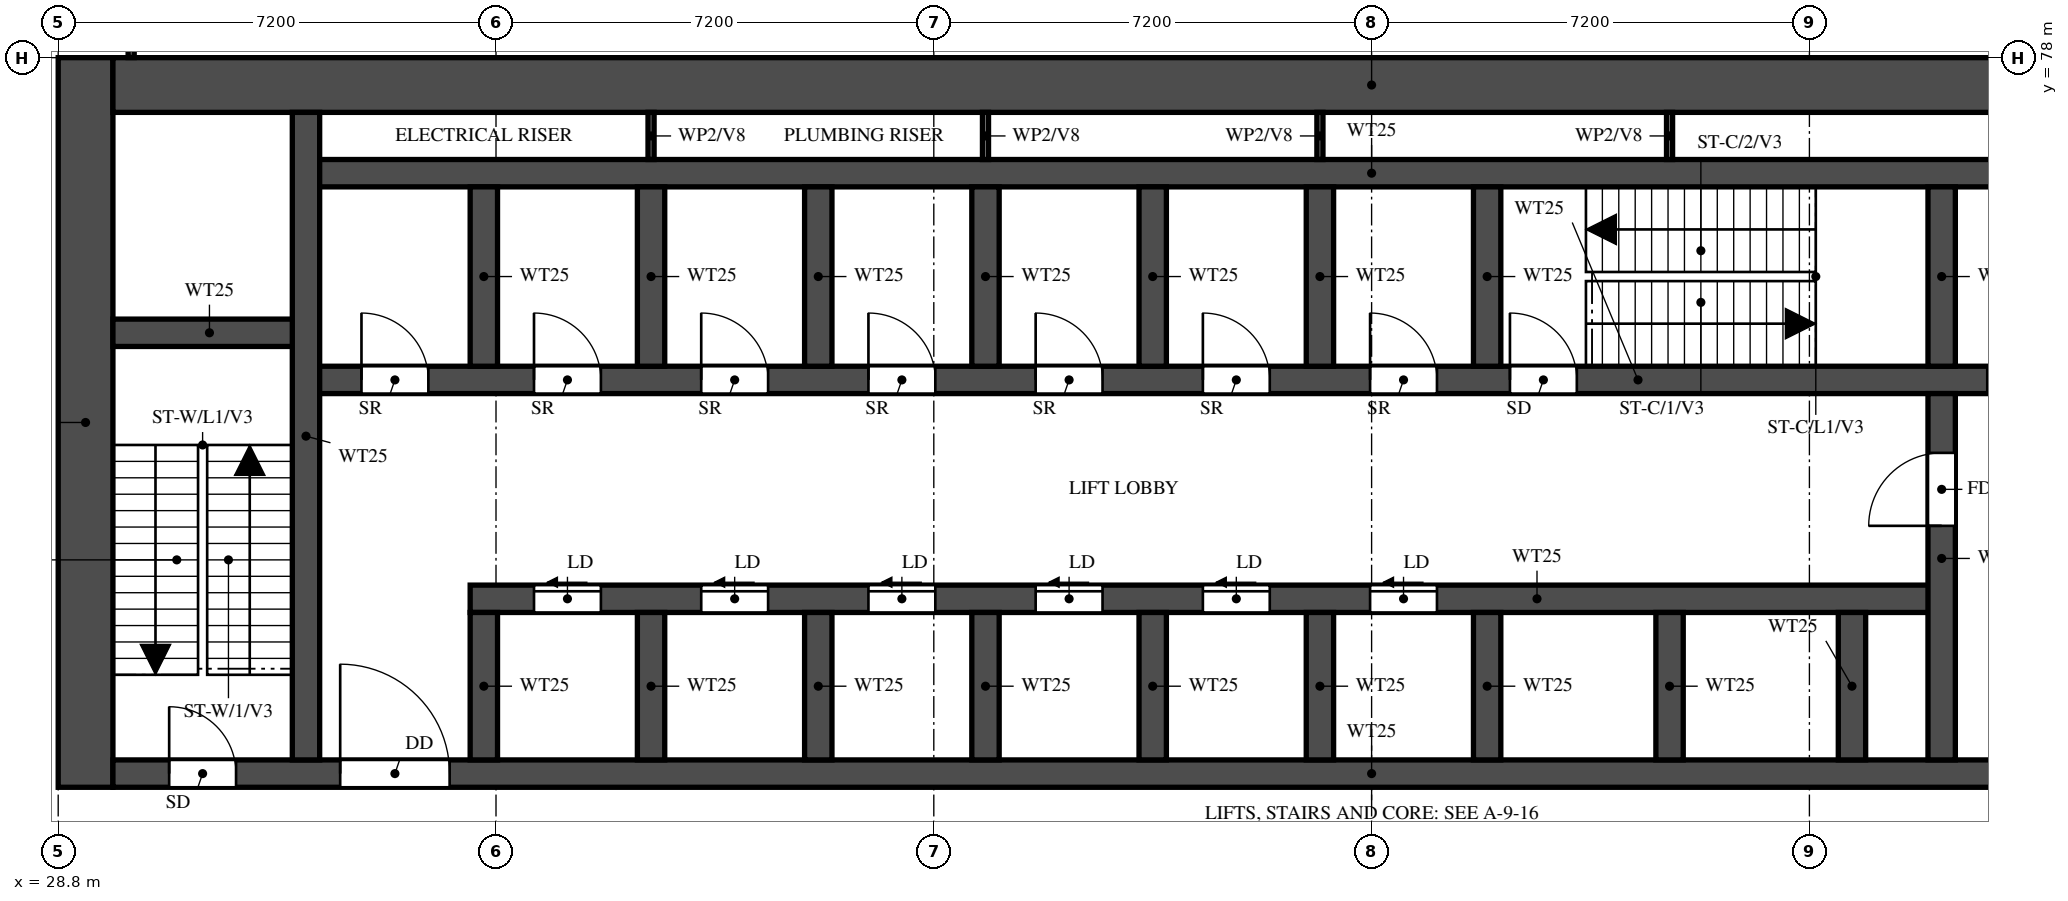
"""IFC4 building model, lengths in metres.
Left out: names, types, materials, properties, quantities, classifications, styles, units other than length and angle.
Written with IfcOpenShell. Run it as: python <this file> out.ifc"""

import sys

from ifc_helpers import new_model, si_unit, direction, frame, frame_2d, origin, place, context, subcontext, project, spatial, rectangle, extrude, element, fill, save


model = new_model("IFC4")
c1 = context("Model", 3, precision=1e-05, world=origin(), true_north=direction((0.0, 1.0)))
c2 = subcontext(c1, "Body", "Model", "MODEL_VIEW")
j1 = project(units=[si_unit("LENGTHUNIT", "METRE"), si_unit("PLANEANGLEUNIT", "RADIAN")], contexts=[c1])
p1 = place(None, origin())
s1 = spatial("IfcSite", under=j1, at=p1, CompositionType="ELEMENT")
p2 = place(p1, origin())
s2 = spatial("IfcBuilding", under=s1, at=p2, CompositionType="ELEMENT")
p3 = place(p2, frame((0.0, 0.0, 107.5)))
s3 = spatial("IfcBuildingStorey", under=s2, at=p3, CompositionType="ELEMENT", Elevation=107.5)
p4 = place(p3, frame((29.25, 66.0, 0.0), z_axis=(0.0, 0.0, 1.0), x_axis=(0.0, 1.0, 0.0)))
e1 = element("IfcWall", 1, at=p4, inside=s3, PredefinedType="SHEAR", context=c2, shape_type="SweptSolid", body=[
    extrude(rectangle(XDim=12.0, YDim=0.9, at=frame_2d((6.0, 0.0))), origin(), (0.0, 0.0, 1.0), 5.2),
])
p5 = place(p3, frame((29.7, 77.55, 0.0), z_axis=(0.0, 0.0, 1.0), x_axis=(1.0, 0.0, 0.0)))
e2 = element("IfcWall", 2, at=p5, inside=s3, PredefinedType="SHEAR", context=c2, shape_type="SweptSolid", body=[
    extrude(rectangle(XDim=41.4, YDim=0.9, at=frame_2d((20.7, 0.0))), origin(), (0.0, 0.0, 1.0), 5.2),
])
p6 = place(p3, frame((29.7, 66.225, 0.0), z_axis=(0.0, 0.0, 1.0), x_axis=(1.0, 0.0, 0.0)))
e3 = element("IfcWall", 3, at=p6, inside=s3, PredefinedType="SHEAR", context=c2, shape_type="SweptSolid", body=[
    extrude(rectangle(XDim=41.4, YDim=0.45, at=frame_2d((20.7, 0.0))), origin(), (0.0, 0.0, 1.0), 5.2),
])
p7 = place(p6, frame((0.925, 0.0, 0.0)))
e4 = element("IfcOpeningElement", 4, at=p7, cuts=e3, PredefinedType="OPENING", context=c2, shape_type="SweptSolid", body=[
    extrude(rectangle(XDim=1.1, YDim=2.1, at=frame_2d((0.55, 1.05))), frame((0.0, 0.235, 0.0), z_axis=(0.0, -1.0, 0.0), x_axis=(1.0, 0.0, 0.0)), (0.0, 0.0, 1.0), 0.47),
])
p8 = place(p6, frame((3.738, 0.0, 0.0)))
e5 = element("IfcOpeningElement", 5, at=p8, cuts=e3, PredefinedType="OPENING", context=c2, shape_type="SweptSolid", body=[
    extrude(rectangle(XDim=1.8, YDim=2.1, at=frame_2d((0.9, 1.05))), frame((0.0, 0.235, 0.0), z_axis=(0.0, -1.0, 0.0), x_axis=(1.0, 0.0, 0.0)), (0.0, 0.0, 1.0), 0.47),
])
p9 = place(p3, frame((35.575, 69.1, 0.0), z_axis=(0.0, 0.0, 1.0), x_axis=(1.0, 0.0, 0.0)))
e6 = element("IfcWall", 6, at=p9, inside=s3, PredefinedType="SHEAR", context=c2, shape_type="SweptSolid", body=[
    extrude(rectangle(XDim=24.2, YDim=0.45, at=frame_2d((12.1, 0.0))), origin(), (0.0, 0.0, 1.0), 5.2),
])
p10 = place(p9, frame((1.05, 0.0, 0.0)))
e7 = element("IfcOpeningElement", 7, at=p10, cuts=e6, PredefinedType="OPENING", context=c2, shape_type="SweptSolid", body=[
    extrude(rectangle(XDim=1.1, YDim=2.1, at=frame_2d((0.55, 1.05))), frame((0.0, 0.235, 0.0), z_axis=(0.0, -1.0, 0.0), x_axis=(1.0, 0.0, 0.0)), (0.0, 0.0, 1.0), 0.47),
])
p11 = place(p9, frame((3.8, 0.0, 0.0)))
e8 = element("IfcOpeningElement", 8, at=p11, cuts=e6, PredefinedType="OPENING", context=c2, shape_type="SweptSolid", body=[
    extrude(rectangle(XDim=1.1, YDim=2.1, at=frame_2d((0.55, 1.05))), frame((0.0, 0.235, 0.0), z_axis=(0.0, -1.0, 0.0), x_axis=(1.0, 0.0, 0.0)), (0.0, 0.0, 1.0), 0.47),
])
p12 = place(p9, frame((6.55, 0.0, 0.0)))
e9 = element("IfcOpeningElement", 9, at=p12, cuts=e6, PredefinedType="OPENING", context=c2, shape_type="SweptSolid", body=[
    extrude(rectangle(XDim=1.1, YDim=2.1, at=frame_2d((0.55, 1.05))), frame((0.0, 0.235, 0.0), z_axis=(0.0, -1.0, 0.0), x_axis=(1.0, 0.0, 0.0)), (0.0, 0.0, 1.0), 0.47),
])
p13 = place(p9, frame((9.3, 0.0, 0.0)))
e10 = element("IfcOpeningElement", 10, at=p13, cuts=e6, PredefinedType="OPENING", context=c2, shape_type="SweptSolid", body=[
    extrude(rectangle(XDim=1.1, YDim=2.1, at=frame_2d((0.55, 1.05))), frame((0.0, 0.235, 0.0), z_axis=(0.0, -1.0, 0.0), x_axis=(1.0, 0.0, 0.0)), (0.0, 0.0, 1.0), 0.47),
])
p14 = place(p9, frame((12.05, 0.0, 0.0)))
e11 = element("IfcOpeningElement", 11, at=p14, cuts=e6, PredefinedType="OPENING", context=c2, shape_type="SweptSolid", body=[
    extrude(rectangle(XDim=1.1, YDim=2.1, at=frame_2d((0.55, 1.05))), frame((0.0, 0.235, 0.0), z_axis=(0.0, -1.0, 0.0), x_axis=(1.0, 0.0, 0.0)), (0.0, 0.0, 1.0), 0.47),
])
p15 = place(p9, frame((14.8, 0.0, 0.0)))
e12 = element("IfcOpeningElement", 12, at=p15, cuts=e6, PredefinedType="OPENING", context=c2, shape_type="SweptSolid", body=[
    extrude(rectangle(XDim=1.1, YDim=2.1, at=frame_2d((0.55, 1.05))), frame((0.0, 0.235, 0.0), z_axis=(0.0, -1.0, 0.0), x_axis=(1.0, 0.0, 0.0)), (0.0, 0.0, 1.0), 0.47),
])
p16 = place(p3, frame((32.875, 72.7, 0.0), z_axis=(0.0, 0.0, 1.0), x_axis=(1.0, 0.0, 0.0)))
e13 = element("IfcWall", 13, at=p16, inside=s3, PredefinedType="SHEAR", context=c2, shape_type="SweptSolid", body=[
    extrude(rectangle(XDim=35.05, YDim=0.45, at=frame_2d((17.525, 0.0))), origin(), (0.0, 0.0, 1.0), 5.2),
])
p17 = place(p16, frame((19.8, 0.0, 0.0)))
e14 = element("IfcOpeningElement", 14, at=p17, cuts=e13, PredefinedType="OPENING", context=c2, shape_type="SweptSolid", body=[
    extrude(rectangle(XDim=1.1, YDim=2.1, at=frame_2d((0.55, 1.05))), frame((0.0, 0.235, 0.0), z_axis=(0.0, -1.0, 0.0), x_axis=(1.0, 0.0, 0.0)), (0.0, 0.0, 1.0), 0.47),
])
p18 = place(p16, frame((27.65, 0.0, 0.0)))
e15 = element("IfcOpeningElement", 15, at=p18, cuts=e13, PredefinedType="OPENING", context=c2, shape_type="SweptSolid", body=[
    extrude(rectangle(XDim=1.1, YDim=2.1, at=frame_2d((0.55, 1.05))), frame((0.0, 0.235, 0.0), z_axis=(0.0, -1.0, 0.0), x_axis=(1.0, 0.0, 0.0)), (0.0, 0.0, 1.0), 0.47),
])
p19 = place(p16, frame((30.25, 0.0, 0.0)))
e16 = element("IfcOpeningElement", 16, at=p19, cuts=e13, PredefinedType="OPENING", context=c2, shape_type="SweptSolid", body=[
    extrude(rectangle(XDim=1.1, YDim=2.1, at=frame_2d((0.55, 1.05))), frame((0.0, 0.235, 0.0), z_axis=(0.0, -1.0, 0.0), x_axis=(1.0, 0.0, 0.0)), (0.0, 0.0, 1.0), 0.47),
])
p20 = place(p16, frame((3.75, 0.0, 0.0)))
e17 = element("IfcOpeningElement", 17, at=p20, cuts=e13, PredefinedType="OPENING", context=c2, shape_type="SweptSolid", body=[
    extrude(rectangle(XDim=1.1, YDim=2.1, at=frame_2d((0.55, 1.05))), frame((0.0, 0.235, 0.0), z_axis=(0.0, -1.0, 0.0), x_axis=(1.0, 0.0, 0.0)), (0.0, 0.0, 1.0), 0.47),
])
p21 = place(p16, frame((6.5, 0.0, 0.0)))
e18 = element("IfcOpeningElement", 18, at=p21, cuts=e13, PredefinedType="OPENING", context=c2, shape_type="SweptSolid", body=[
    extrude(rectangle(XDim=1.1, YDim=2.1, at=frame_2d((0.55, 1.05))), frame((0.0, 0.235, 0.0), z_axis=(0.0, -1.0, 0.0), x_axis=(1.0, 0.0, 0.0)), (0.0, 0.0, 1.0), 0.47),
])
p22 = place(p16, frame((9.25, 0.0, 0.0)))
e19 = element("IfcOpeningElement", 19, at=p22, cuts=e13, PredefinedType="OPENING", context=c2, shape_type="SweptSolid", body=[
    extrude(rectangle(XDim=1.1, YDim=2.1, at=frame_2d((0.55, 1.05))), frame((0.0, 0.235, 0.0), z_axis=(0.0, -1.0, 0.0), x_axis=(1.0, 0.0, 0.0)), (0.0, 0.0, 1.0), 0.47),
])
p23 = place(p16, frame((12.0, 0.0, 0.0)))
e20 = element("IfcOpeningElement", 20, at=p23, cuts=e13, PredefinedType="OPENING", context=c2, shape_type="SweptSolid", body=[
    extrude(rectangle(XDim=1.1, YDim=2.1, at=frame_2d((0.55, 1.05))), frame((0.0, 0.235, 0.0), z_axis=(0.0, -1.0, 0.0), x_axis=(1.0, 0.0, 0.0)), (0.0, 0.0, 1.0), 0.47),
])
p24 = place(p16, frame((14.75, 0.0, 0.0)))
e21 = element("IfcOpeningElement", 21, at=p24, cuts=e13, PredefinedType="OPENING", context=c2, shape_type="SweptSolid", body=[
    extrude(rectangle(XDim=1.1, YDim=2.1, at=frame_2d((0.55, 1.05))), frame((0.0, 0.235, 0.0), z_axis=(0.0, -1.0, 0.0), x_axis=(1.0, 0.0, 0.0)), (0.0, 0.0, 1.0), 0.47),
])
p25 = place(p16, frame((17.5, 0.0, 0.0)))
e22 = element("IfcOpeningElement", 22, at=p25, cuts=e13, PredefinedType="OPENING", context=c2, shape_type="SweptSolid", body=[
    extrude(rectangle(XDim=1.1, YDim=2.1, at=frame_2d((0.55, 1.05))), frame((0.0, 0.235, 0.0), z_axis=(0.0, -1.0, 0.0), x_axis=(1.0, 0.0, 0.0)), (0.0, 0.0, 1.0), 0.47),
])
p26 = place(p16, frame((0.913, 0.0, 0.0)))
e23 = element("IfcOpeningElement", 23, at=p26, cuts=e13, PredefinedType="OPENING", context=c2, shape_type="SweptSolid", body=[
    extrude(rectangle(XDim=1.1, YDim=2.1, at=frame_2d((0.55, 1.05))), frame((0.0, 0.235, 0.0), z_axis=(0.0, -1.0, 0.0), x_axis=(1.0, 0.0, 0.0)), (0.0, 0.0, 1.0), 0.47),
])
p27 = place(p3, frame((32.875, 76.1, 0.0), z_axis=(0.0, 0.0, 1.0), x_axis=(1.0, 0.0, 0.0)))
e24 = element("IfcWall", 24, at=p27, inside=s3, PredefinedType="SHEAR", context=c2, shape_type="SweptSolid", body=[
    extrude(rectangle(XDim=35.05, YDim=0.45, at=frame_2d((17.525, 0.0))), origin(), (0.0, 0.0, 1.0), 5.2),
])
p28 = place(p3, frame((29.7, 73.475, 0.0), z_axis=(0.0, 0.0, 1.0), x_axis=(1.0, 0.0, 0.0)))
e25 = element("IfcWall", 25, at=p28, inside=s3, PredefinedType="SHEAR", context=c2, shape_type="SweptSolid", body=[
    extrude(rectangle(XDim=3.175, YDim=0.45, at=frame_2d((1.587, 0.0))), origin(), (0.0, 0.0, 1.0), 5.2),
])
p29 = place(p3, frame((32.875, 66.45, 0.0), z_axis=(0.0, 0.0, 1.0), x_axis=(0.0, 1.0, 0.0)))
e26 = element("IfcWall", 26, at=p29, inside=s3, PredefinedType="SHEAR", context=c2, shape_type="SweptSolid", body=[
    extrude(rectangle(XDim=10.65, YDim=0.45, at=frame_2d((5.325, 0.0))), origin(), (0.0, 0.0, 1.0), 5.2),
])
p30 = place(p3, frame((59.775, 66.45, 0.0), z_axis=(0.0, 0.0, 1.0), x_axis=(0.0, 1.0, 0.0)))
e27 = element("IfcWall", 27, at=p30, inside=s3, PredefinedType="SHEAR", context=c2, shape_type="SweptSolid", body=[
    extrude(rectangle(XDim=6.025, YDim=0.45, at=frame_2d((3.013, 0.0))), origin(), (0.0, 0.0, 1.0), 5.2),
])
p31 = place(p30, frame((3.85, 0.0, 0.0)))
e28 = element("IfcOpeningElement", 28, at=p31, cuts=e27, PredefinedType="OPENING", context=c2, shape_type="SweptSolid", body=[
    extrude(rectangle(XDim=1.2, YDim=2.1, at=frame_2d((0.6, 1.05))), frame((0.0, 0.235, 0.0), z_axis=(0.0, -1.0, 0.0), x_axis=(1.0, 0.0, 0.0)), (0.0, 0.0, 1.0), 0.47),
])
p32 = place(p3, frame((59.775, 72.925, 0.0), z_axis=(0.0, 0.0, 1.0), x_axis=(0.0, 1.0, 0.0)))
e29 = element("IfcWall", 29, at=p32, inside=s3, PredefinedType="SHEAR", context=c2, shape_type="SweptSolid", body=[
    extrude(rectangle(XDim=2.95, YDim=0.45, at=frame_2d((1.475, 0.0))), origin(), (0.0, 0.0, 1.0), 5.2),
])
for number, where, z_axis, x_axis in (
    (30, (35.8, 66.45, 0.0), (0.0, 0.0, 1.0), (0.0, 1.0, 0.0)),
    (31, (38.55, 66.45, 0.0), (0.0, 0.0, 1.0), (0.0, 1.0, 0.0)),
    (32, (41.3, 66.45, 0.0), (0.0, 0.0, 1.0), (0.0, 1.0, 0.0)),
    (33, (44.05, 66.45, 0.0), (0.0, 0.0, 1.0), (0.0, 1.0, 0.0)),
    (34, (46.8, 66.45, 0.0), (0.0, 0.0, 1.0), (0.0, 1.0, 0.0)),
    (35, (49.55, 66.45, 0.0), (0.0, 0.0, 1.0), (0.0, 1.0, 0.0)),
    (36, (52.3, 66.45, 0.0), (0.0, 0.0, 1.0), (0.0, 1.0, 0.0)),
    (37, (55.3, 66.45, 0.0), (0.0, 0.0, 1.0), (0.0, 1.0, 0.0)),
    (38, (58.3, 66.45, 0.0), (0.0, 0.0, 1.0), (0.0, 1.0, 0.0)),
):
    element("IfcWall", number, at=place(p3, frame(where, z_axis=z_axis, x_axis=x_axis)), inside=s3, PredefinedType="SHEAR", context=c2, shape_type="SweptSolid", body=[
        extrude(rectangle(XDim=2.425, YDim=0.45, at=frame_2d((1.212, 0.0))), origin(), (0.0, 0.0, 1.0), 5.2),
    ])
for number, where, z_axis, x_axis in (
    (39, (35.8, 72.925, 0.0), (0.0, 0.0, 1.0), (0.0, 1.0, 0.0)),
    (40, (38.55, 72.925, 0.0), (0.0, 0.0, 1.0), (0.0, 1.0, 0.0)),
    (41, (41.3, 72.925, 0.0), (0.0, 0.0, 1.0), (0.0, 1.0, 0.0)),
    (42, (44.05, 72.925, 0.0), (0.0, 0.0, 1.0), (0.0, 1.0, 0.0)),
    (43, (46.8, 72.925, 0.0), (0.0, 0.0, 1.0), (0.0, 1.0, 0.0)),
    (44, (49.55, 72.925, 0.0), (0.0, 0.0, 1.0), (0.0, 1.0, 0.0)),
    (45, (52.3, 72.925, 0.0), (0.0, 0.0, 1.0), (0.0, 1.0, 0.0)),
):
    element("IfcWall", number, at=place(p3, frame(where, z_axis=z_axis, x_axis=x_axis)), inside=s3, PredefinedType="SHEAR", context=c2, shape_type="SweptSolid", body=[
        extrude(rectangle(XDim=2.95, YDim=0.45, at=frame_2d((1.475, 0.0))), origin(), (0.0, 0.0, 1.0), 5.2),
    ])
for number, where, z_axis, x_axis in (
    (46, (38.55, 76.325, 0.0), (0.0, 0.0, 1.0), (0.0, 1.0, 0.0)),
    (47, (44.05, 76.325, 0.0), (0.0, 0.0, 1.0), (0.0, 1.0, 0.0)),
    (48, (49.55, 76.325, 0.0), (0.0, 0.0, 1.0), (0.0, 1.0, 0.0)),
    (49, (55.3, 76.325, 0.0), (0.0, 0.0, 1.0), (0.0, 1.0, 0.0)),
):
    element("IfcWall", number, at=place(p3, frame(where, z_axis=z_axis, x_axis=x_axis)), inside=s3, PredefinedType="PARTITIONING", context=c2, shape_type="SweptSolid", body=[
        extrude(rectangle(XDim=0.775, YDim=0.1, at=frame_2d((0.388, 0.0))), origin(), (0.0, 0.0, 1.0), 5.2),
    ])
p33 = place(p3, frame((30.0, 78.002, 0.0), z_axis=(0.0, 0.0, 1.0), x_axis=(0.0, 1.0, 0.0)))
e50 = element("IfcWall", 50, at=p33, inside=s3, PredefinedType="PARTITIONING", context=c2, shape_type="SweptSolid", body=[
    extrude(rectangle(XDim=1.398, YDim=0.1, at=frame_2d((0.699, 0.0))), origin(), (0.0, 0.0, 1.0), 5.2),
])
p34 = place(p7, origin())
e51 = element("IfcDoor", 51, at=p34, inside=s3, OperationType="SINGLE_SWING_LEFT", PredefinedType="DOOR", context=c2, shape_type="SweptSolid", body=[
    extrude(rectangle(XDim=1.1, YDim=2.1, at=frame_2d((0.55, 1.05))), frame((0.0, 0.025, 0.0), z_axis=(0.0, -1.0, 0.0), x_axis=(1.0, 0.0, 0.0)), (0.0, 0.0, 1.0), 0.05),
])
fill(e4, e51)
p35 = place(p17, origin())
e52 = element("IfcDoor", 52, at=p35, inside=s3, OperationType="SINGLE_SWING_LEFT", PredefinedType="DOOR", context=c2, shape_type="SweptSolid", body=[
    extrude(rectangle(XDim=1.1, YDim=2.1, at=frame_2d((0.55, 1.05))), frame((0.0, 0.025, 0.0), z_axis=(0.0, -1.0, 0.0), x_axis=(1.0, 0.0, 0.0)), (0.0, 0.0, 1.0), 0.05),
])
fill(e14, e52)
p36 = place(p8, origin())
e53 = element("IfcDoor", 53, at=p36, inside=s3, OperationType="DOUBLE_DOOR_SINGLE_SWING", PredefinedType="DOOR", context=c2, shape_type="SweptSolid", body=[
    extrude(rectangle(XDim=1.8, YDim=2.1, at=frame_2d((0.9, 1.05))), frame((0.0, 0.025, 0.0), z_axis=(0.0, -1.0, 0.0), x_axis=(1.0, 0.0, 0.0)), (0.0, 0.0, 1.0), 0.05),
])
fill(e5, e53)
p37 = place(p31, origin())
e54 = element("IfcDoor", 54, at=p37, inside=s3, OperationType="SINGLE_SWING_RIGHT", PredefinedType="DOOR", context=c2, shape_type="SweptSolid", body=[
    extrude(rectangle(XDim=1.2, YDim=2.1, at=frame_2d((0.6, 1.05))), frame((0.0, 0.025, 0.0), z_axis=(0.0, -1.0, 0.0), x_axis=(1.0, 0.0, 0.0)), (0.0, 0.0, 1.0), 0.05),
])
fill(e28, e54)
p38 = place(p18, origin())
e55 = element("IfcDoor", 55, at=p38, inside=s3, OperationType="SLIDING_TO_LEFT", PredefinedType="DOOR", context=c2, shape_type="SweptSolid", body=[
    extrude(rectangle(XDim=1.1, YDim=2.1, at=frame_2d((0.55, 1.05))), frame((0.0, 0.025, 0.0), z_axis=(0.0, -1.0, 0.0), x_axis=(1.0, 0.0, 0.0)), (0.0, 0.0, 1.0), 0.05),
])
fill(e15, e55)
p39 = place(p10, origin())
e56 = element("IfcDoor", 56, at=p39, inside=s3, OperationType="SLIDING_TO_LEFT", PredefinedType="DOOR", context=c2, shape_type="SweptSolid", body=[
    extrude(rectangle(XDim=1.1, YDim=2.1, at=frame_2d((0.55, 1.05))), frame((0.0, 0.025, 0.0), z_axis=(0.0, -1.0, 0.0), x_axis=(1.0, 0.0, 0.0)), (0.0, 0.0, 1.0), 0.05),
])
fill(e7, e56)
p40 = place(p11, origin())
e57 = element("IfcDoor", 57, at=p40, inside=s3, OperationType="SLIDING_TO_LEFT", PredefinedType="DOOR", context=c2, shape_type="SweptSolid", body=[
    extrude(rectangle(XDim=1.1, YDim=2.1, at=frame_2d((0.55, 1.05))), frame((0.0, 0.025, 0.0), z_axis=(0.0, -1.0, 0.0), x_axis=(1.0, 0.0, 0.0)), (0.0, 0.0, 1.0), 0.05),
])
fill(e8, e57)
p41 = place(p12, origin())
e58 = element("IfcDoor", 58, at=p41, inside=s3, OperationType="SLIDING_TO_LEFT", PredefinedType="DOOR", context=c2, shape_type="SweptSolid", body=[
    extrude(rectangle(XDim=1.1, YDim=2.1, at=frame_2d((0.55, 1.05))), frame((0.0, 0.025, 0.0), z_axis=(0.0, -1.0, 0.0), x_axis=(1.0, 0.0, 0.0)), (0.0, 0.0, 1.0), 0.05),
])
fill(e9, e58)
p42 = place(p13, origin())
e59 = element("IfcDoor", 59, at=p42, inside=s3, OperationType="SLIDING_TO_LEFT", PredefinedType="DOOR", context=c2, shape_type="SweptSolid", body=[
    extrude(rectangle(XDim=1.1, YDim=2.1, at=frame_2d((0.55, 1.05))), frame((0.0, 0.025, 0.0), z_axis=(0.0, -1.0, 0.0), x_axis=(1.0, 0.0, 0.0)), (0.0, 0.0, 1.0), 0.05),
])
fill(e10, e59)
p43 = place(p14, origin())
e60 = element("IfcDoor", 60, at=p43, inside=s3, OperationType="SLIDING_TO_LEFT", PredefinedType="DOOR", context=c2, shape_type="SweptSolid", body=[
    extrude(rectangle(XDim=1.1, YDim=2.1, at=frame_2d((0.55, 1.05))), frame((0.0, 0.025, 0.0), z_axis=(0.0, -1.0, 0.0), x_axis=(1.0, 0.0, 0.0)), (0.0, 0.0, 1.0), 0.05),
])
fill(e11, e60)
p44 = place(p15, origin())
e61 = element("IfcDoor", 61, at=p44, inside=s3, OperationType="SLIDING_TO_LEFT", PredefinedType="DOOR", context=c2, shape_type="SweptSolid", body=[
    extrude(rectangle(XDim=1.1, YDim=2.1, at=frame_2d((0.55, 1.05))), frame((0.0, 0.025, 0.0), z_axis=(0.0, -1.0, 0.0), x_axis=(1.0, 0.0, 0.0)), (0.0, 0.0, 1.0), 0.05),
])
fill(e12, e61)
p45 = place(p20, origin())
e62 = element("IfcDoor", 62, at=p45, inside=s3, OperationType="SINGLE_SWING_LEFT", PredefinedType="DOOR", context=c2, shape_type="SweptSolid", body=[
    extrude(rectangle(XDim=1.1, YDim=2.1, at=frame_2d((0.55, 1.05))), frame((0.0, 0.025, 0.0), z_axis=(0.0, -1.0, 0.0), x_axis=(1.0, 0.0, 0.0)), (0.0, 0.0, 1.0), 0.05),
])
fill(e17, e62)
p46 = place(p21, origin())
e63 = element("IfcDoor", 63, at=p46, inside=s3, OperationType="SINGLE_SWING_LEFT", PredefinedType="DOOR", context=c2, shape_type="SweptSolid", body=[
    extrude(rectangle(XDim=1.1, YDim=2.1, at=frame_2d((0.55, 1.05))), frame((0.0, 0.025, 0.0), z_axis=(0.0, -1.0, 0.0), x_axis=(1.0, 0.0, 0.0)), (0.0, 0.0, 1.0), 0.05),
])
fill(e18, e63)
p47 = place(p22, origin())
e64 = element("IfcDoor", 64, at=p47, inside=s3, OperationType="SINGLE_SWING_LEFT", PredefinedType="DOOR", context=c2, shape_type="SweptSolid", body=[
    extrude(rectangle(XDim=1.1, YDim=2.1, at=frame_2d((0.55, 1.05))), frame((0.0, 0.025, 0.0), z_axis=(0.0, -1.0, 0.0), x_axis=(1.0, 0.0, 0.0)), (0.0, 0.0, 1.0), 0.05),
])
fill(e19, e64)
p48 = place(p23, origin())
e65 = element("IfcDoor", 65, at=p48, inside=s3, OperationType="SINGLE_SWING_LEFT", PredefinedType="DOOR", context=c2, shape_type="SweptSolid", body=[
    extrude(rectangle(XDim=1.1, YDim=2.1, at=frame_2d((0.55, 1.05))), frame((0.0, 0.025, 0.0), z_axis=(0.0, -1.0, 0.0), x_axis=(1.0, 0.0, 0.0)), (0.0, 0.0, 1.0), 0.05),
])
fill(e20, e65)
p49 = place(p24, origin())
e66 = element("IfcDoor", 66, at=p49, inside=s3, OperationType="SINGLE_SWING_LEFT", PredefinedType="DOOR", context=c2, shape_type="SweptSolid", body=[
    extrude(rectangle(XDim=1.1, YDim=2.1, at=frame_2d((0.55, 1.05))), frame((0.0, 0.025, 0.0), z_axis=(0.0, -1.0, 0.0), x_axis=(1.0, 0.0, 0.0)), (0.0, 0.0, 1.0), 0.05),
])
fill(e21, e66)
p50 = place(p25, origin())
e67 = element("IfcDoor", 67, at=p50, inside=s3, OperationType="SINGLE_SWING_LEFT", PredefinedType="DOOR", context=c2, shape_type="SweptSolid", body=[
    extrude(rectangle(XDim=1.1, YDim=2.1, at=frame_2d((0.55, 1.05))), frame((0.0, 0.025, 0.0), z_axis=(0.0, -1.0, 0.0), x_axis=(1.0, 0.0, 0.0)), (0.0, 0.0, 1.0), 0.05),
])
fill(e22, e67)
p51 = place(p26, origin())
e68 = element("IfcDoor", 68, at=p51, inside=s3, OperationType="SINGLE_SWING_LEFT", PredefinedType="DOOR", context=c2, shape_type="SweptSolid", body=[
    extrude(rectangle(XDim=1.1, YDim=2.1, at=frame_2d((0.55, 1.05))), frame((0.0, 0.025, 0.0), z_axis=(0.0, -1.0, 0.0), x_axis=(1.0, 0.0, 0.0)), (0.0, 0.0, 1.0), 0.05),
])
fill(e23, e68)
save(model, sys.argv[1])
